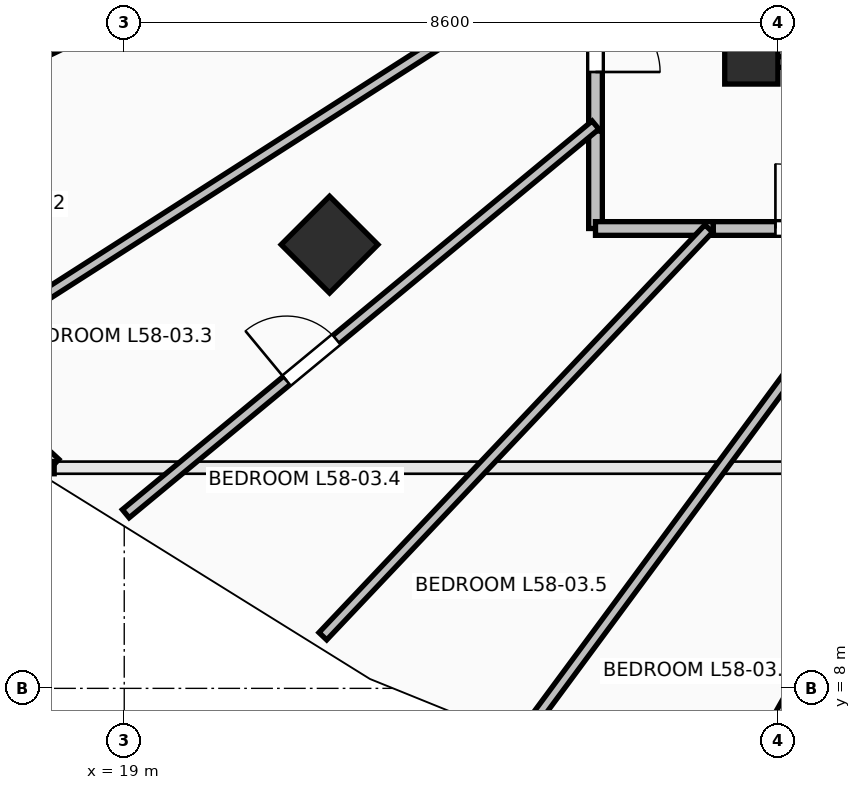
"""IFC4 building model, lengths in metres.
Left out: names, types, materials, properties, quantities, classifications, styles, units other than length and angle.
Written with IfcOpenShell. Run it as: python <this file> out.ifc"""

import sys

from ifc_helpers import new_model, si_unit, direction, frame, frame_2d, origin, origin_2d, place, context, subcontext, project, spatial, rectangle, extrude, element, fill, save


model = new_model("IFC4")
c1 = context("Model", 3, precision=1e-05, world=origin(), true_north=direction((0.0, 1.0)))
c2 = subcontext(c1, "Body", "Model", "MODEL_VIEW")
j1 = project(units=[si_unit("LENGTHUNIT", "METRE"), si_unit("PLANEANGLEUNIT", "RADIAN")], contexts=[c1])
p1 = place(None, origin())
s1 = spatial("IfcSite", under=j1, at=p1, CompositionType="ELEMENT")
p2 = place(p1, origin())
s2 = spatial("IfcBuilding", under=s1, at=p2, CompositionType="ELEMENT")
p3 = place(p2, frame((0.0, 0.0, 214.3)))
s3 = spatial("IfcBuildingStorey", under=s2, at=p3, CompositionType="ELEMENT", Elevation=214.3)
p4 = place(p3, frame((21.701, 13.838, 0.0), z_axis=(0.0, 0.0, 1.0), x_axis=(-0.707106781187, -0.707106781187, 0.0)))
e1 = element("IfcColumn", 1, at=p4, inside=s3, PredefinedType="COLUMN", context=c2, shape_type="SweptSolid", body=[
    extrude(rectangle(XDim=0.9, YDim=0.9, at=origin_2d()), origin(), (0.0, 0.0, 1.0), 3.55),
])
p5 = place(p3, frame((27.25, 16.45, 0.0), z_axis=(0.0, 0.0, 1.0), x_axis=(1.0, 0.0, 0.0)))
e2 = element("IfcColumn", 2, at=p5, inside=s3, PredefinedType="PILASTER", context=c2, shape_type="SweptSolid", body=[
    extrude(rectangle(XDim=0.7, YDim=1.0, at=origin_2d()), origin(), (0.0, 0.0, 1.0), 3.55),
])
p6 = place(p3, frame((14.528, 14.139, 0.0), z_axis=(0.0, 0.0, 1.0), x_axis=(0.735359993374, -0.677676678177, 0.0)))
e3 = element("IfcWall", 3, at=p6, inside=s3, PredefinedType="STANDARD", context=c2, shape_type="SweptSolid", body=[
    extrude(rectangle(XDim=4.774, YDim=0.3, at=frame_2d((2.387, 0.0))), origin(), (0.0, 0.0, 1.0), 3.29),
])
p7 = place(p6, frame((1.158, 0.0, 0.85)))
e4 = element("IfcOpeningElement", 4, at=p7, cuts=e3, PredefinedType="OPENING", context=c2, shape_type="SweptSolid", body=[
    extrude(rectangle(XDim=1.2, YDim=1.95, at=frame_2d((0.6, 0.975))), frame((0.0, 0.165, 0.0), z_axis=(0.0, -1.0, 0.0), x_axis=(1.0, 0.0, 0.0)), (0.0, 0.0, 1.0), 0.33),
])
p8 = place(p6, frame((3.195, 0.0, 0.85)))
e5 = element("IfcOpeningElement", 5, at=p8, cuts=e3, PredefinedType="OPENING", context=c2, shape_type="SweptSolid", body=[
    extrude(rectangle(XDim=1.2, YDim=1.95, at=frame_2d((0.6, 0.975))), frame((0.0, 0.165, 0.0), z_axis=(0.0, -1.0, 0.0), x_axis=(1.0, 0.0, 0.0)), (0.0, 0.0, 1.0), 0.33),
])
p9 = place(p3, frame((25.2, 17.735, 0.0), z_axis=(0.0, 0.0, 1.0), x_axis=(0.0, -1.0, 0.0)))
e6 = element("IfcWall", 6, at=p9, inside=s3, PredefinedType="PARTITIONING", context=c2, shape_type="SweptSolid", body=[
    extrude(rectangle(XDim=2.402, YDim=0.18, at=frame_2d((1.201, 0.0))), origin(), (0.0, 0.0, 1.0), 2.482),
])
p10 = place(p9, frame((0.776, 0.0, 0.0)))
e7 = element("IfcOpeningElement", 7, at=p10, cuts=e6, PredefinedType="OPENING", context=c2, shape_type="SweptSolid", body=[
    extrude(rectangle(XDim=0.85, YDim=2.1, at=frame_2d((0.425, 1.05))), frame((0.0, 0.105, 0.0), z_axis=(0.0, -1.0, 0.0), x_axis=(1.0, 0.0, 0.0)), (0.0, 0.0, 1.0), 0.21),
])
p11 = place(p3, frame((25.2, 15.333, 0.0), z_axis=(0.0, 0.0, 1.0), x_axis=(0.0, -1.0, 0.0)))
e8 = element("IfcWall", 8, at=p11, inside=s3, PredefinedType="PARTITIONING", context=c2, shape_type="SweptSolid", body=[
    extrude(rectangle(XDim=1.283, YDim=0.18, at=frame_2d((0.642, 0.0))), origin(), (0.0, 0.0, 1.0), 2.482),
])
p12 = place(p3, frame((25.2, 14.05, 0.0), z_axis=(0.0, 0.0, 1.0), x_axis=(1.0, 0.0, 0.0)))
e9 = element("IfcWall", 9, at=p12, inside=s3, PredefinedType="PARTITIONING", context=c2, shape_type="SweptSolid", body=[
    extrude(rectangle(XDim=1.55, YDim=0.18, at=frame_2d((0.775, 0.0))), origin(), (0.0, 0.0, 1.0), 2.936),
])
p13 = place(p3, frame((26.75, 14.05, 0.0), z_axis=(0.0, 0.0, 1.0), x_axis=(1.0, 0.0, 0.0)))
e10 = element("IfcWall", 10, at=p13, inside=s3, PredefinedType="PARTITIONING", context=c2, shape_type="SweptSolid", body=[
    extrude(rectangle(XDim=2.484, YDim=0.18, at=frame_2d((1.242, 0.0))), origin(), (0.0, 0.0, 1.0), 2.482),
])
p14 = place(p13, frame((0.817, 0.0, 0.0)))
e11 = element("IfcOpeningElement", 11, at=p14, cuts=e10, PredefinedType="OPENING", context=c2, shape_type="SweptSolid", body=[
    extrude(rectangle(XDim=0.85, YDim=2.1, at=frame_2d((0.425, 1.05))), frame((0.0, 0.105, 0.0), z_axis=(0.0, -1.0, 0.0), x_axis=(1.0, 0.0, 0.0)), (0.0, 0.0, 1.0), 0.21),
])
p15 = place(p3, frame((14.217, 14.579, 0.0), z_axis=(0.0, 0.0, 1.0), x_axis=(0.901423599975, 0.432938209689, 0.0)))
e12 = element("IfcWall", 12, at=p15, inside=s3, PredefinedType="PARTITIONING", context=c2, shape_type="SweptSolid", body=[
    extrude(rectangle(XDim=12.184, YDim=0.14, at=frame_2d((6.092, 0.0))), origin(), (0.0, 0.0, 1.0), 2.482),
])
p16 = place(p3, frame((16.555, 12.272, 0.0), z_axis=(0.0, 0.0, 1.0), x_axis=(0.842221721565, 0.539131312135, 0.0)))
e13 = element("IfcWall", 13, at=p16, inside=s3, PredefinedType="PARTITIONING", context=c2, shape_type="SweptSolid", body=[
    extrude(rectangle(XDim=10.265, YDim=0.14, at=frame_2d((5.132, 0.0))), origin(), (0.0, 0.0, 1.0), 2.482),
])
p17 = place(p3, frame((19.02, 10.298, 0.0), z_axis=(0.0, 0.0, 1.0), x_axis=(0.770494327523, 0.637446853671, 0.0)))
e14 = element("IfcWall", 14, at=p17, inside=s3, PredefinedType="PARTITIONING", context=c2, shape_type="SweptSolid", body=[
    extrude(rectangle(XDim=8.021, YDim=0.14, at=frame_2d((4.01, 0.0))), origin(), (0.0, 0.0, 1.0), 2.482),
])
p18 = place(p17, frame((2.746, 0.0, 0.0)))
e15 = element("IfcOpeningElement", 15, at=p18, cuts=e14, PredefinedType="OPENING", context=c2, shape_type="SweptSolid", body=[
    extrude(rectangle(XDim=0.85, YDim=2.1, at=frame_2d((0.425, 1.05))), frame((0.0, 0.085, 0.0), z_axis=(0.0, -1.0, 0.0), x_axis=(1.0, 0.0, 0.0)), (0.0, 0.0, 1.0), 0.17),
])
p19 = place(p3, frame((21.613, 8.686, 0.0), z_axis=(0.0, 0.0, 1.0), x_axis=(0.68740257318, 0.726276601844, 0.0)))
e16 = element("IfcWall", 16, at=p19, inside=s3, PredefinedType="PARTITIONING", context=c2, shape_type="SweptSolid", body=[
    extrude(rectangle(XDim=7.386, YDim=0.14, at=frame_2d((3.693, 0.0))), origin(), (0.0, 0.0, 1.0), 2.824),
])
p20 = place(p3, frame((24.298, 7.449, 0.0), z_axis=(0.0, 0.0, 1.0), x_axis=(0.594148459094, 0.804355399408, 0.0)))
e17 = element("IfcWall", 17, at=p20, inside=s3, PredefinedType="PARTITIONING", context=c2, shape_type="SweptSolid", body=[
    extrude(rectangle(XDim=8.207, YDim=0.14, at=frame_2d((4.103, 0.0))), origin(), (0.0, 0.0, 1.0), 2.482),
])
p21 = place(p3, frame((26.916, 6.389, 0.0), z_axis=(0.0, 0.0, 1.0), x_axis=(0.492046286697, 0.870569039047, 0.0)))
e18 = element("IfcWall", 18, at=p21, inside=s3, PredefinedType="PARTITIONING", context=c2, shape_type="SweptSolid", body=[
    extrude(rectangle(XDim=8.8, YDim=0.14, at=frame_2d((4.4, 0.0))), origin(), (0.0, 0.0, 1.0), 2.482),
])
p22 = place(p3, frame((27.45, 23.754, 0.0), z_axis=(0.0, 0.0, 1.0), x_axis=(0.0, -1.0, 0.0)))
e19 = element("IfcWall", 19, at=p22, inside=s3, PredefinedType="PARTITIONING", context=c2, shape_type="SweptSolid", body=[
    extrude(rectangle(XDim=7.514, YDim=0.14, at=frame_2d((3.757, 0.0))), origin(), (0.0, 0.0, 1.0), 2.482),
])
p23 = place(p3, frame((27.45, 16.24, 0.0), z_axis=(0.0, 0.0, 1.0), x_axis=(1.0, 0.0, 0.0)))
e20 = element("IfcWall", 20, at=p23, inside=s3, PredefinedType="PARTITIONING", context=c2, shape_type="SweptSolid", body=[
    extrude(rectangle(XDim=3.745, YDim=0.14, at=frame_2d((1.873, 0.0))), origin(), (0.0, 0.0, 1.0), 2.482),
])
p24 = place(p10, origin())
e21 = element("IfcDoor", 21, at=p24, inside=s3, OperationType="SINGLE_SWING_RIGHT", PredefinedType="DOOR", context=c2, shape_type="SweptSolid", body=[
    extrude(rectangle(XDim=0.85, YDim=2.1, at=frame_2d((0.425, 1.05))), frame((0.0, 0.025, 0.0), z_axis=(0.0, -1.0, 0.0), x_axis=(1.0, 0.0, 0.0)), (0.0, 0.0, 1.0), 0.05),
])
fill(e7, e21)
p25 = place(p14, origin())
e22 = element("IfcDoor", 22, at=p25, inside=s3, OperationType="SINGLE_SWING_LEFT", PredefinedType="DOOR", context=c2, shape_type="SweptSolid", body=[
    extrude(rectangle(XDim=0.85, YDim=2.1, at=frame_2d((0.425, 1.05))), frame((0.0, 0.025, 0.0), z_axis=(0.0, -1.0, 0.0), x_axis=(1.0, 0.0, 0.0)), (0.0, 0.0, 1.0), 0.05),
])
fill(e11, e22)
p26 = place(p18, origin())
e23 = element("IfcDoor", 23, at=p26, inside=s3, OperationType="SINGLE_SWING_LEFT", PredefinedType="DOOR", context=c2, shape_type="SweptSolid", body=[
    extrude(rectangle(XDim=0.85, YDim=2.1, at=frame_2d((0.425, 1.05))), frame((0.0, 0.025, 0.0), z_axis=(0.0, -1.0, 0.0), x_axis=(1.0, 0.0, 0.0)), (0.0, 0.0, 1.0), 0.05),
])
fill(e15, e23)
save(model, sys.argv[1])
